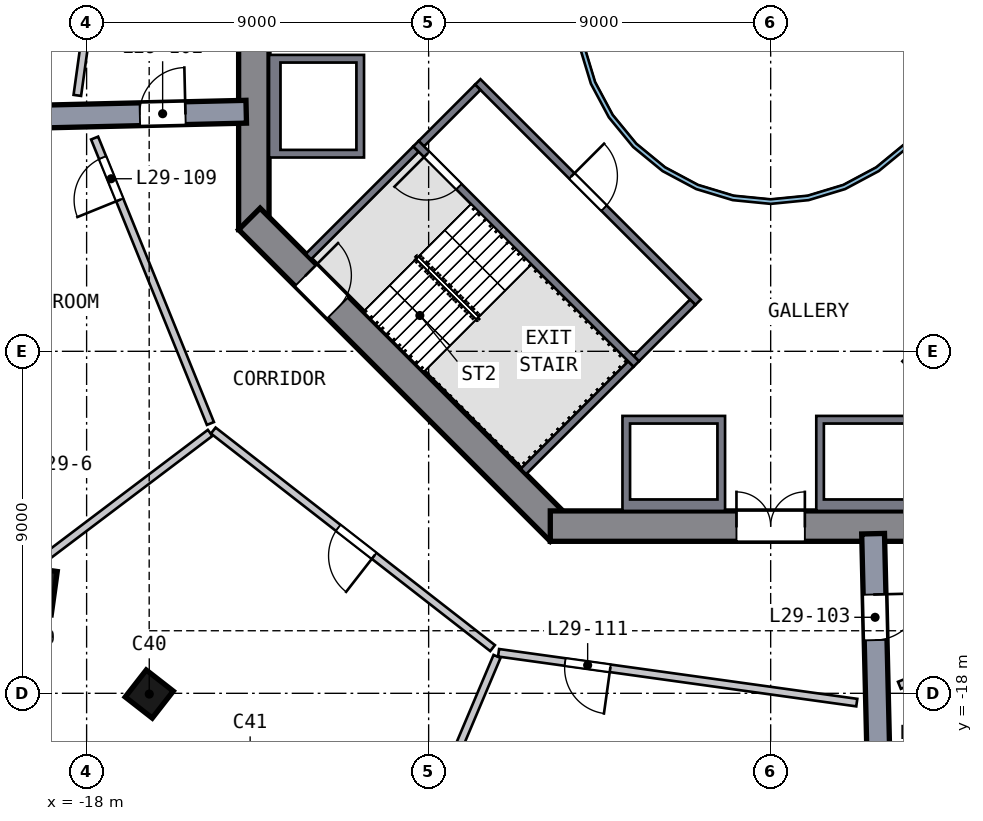
"""IFC4 building model, lengths in metres.
Left out: names, types, materials, properties, quantities, classifications, styles, units other than length and angle.
Written with IfcOpenShell. Run it as: python <this file> out.ifc"""

import sys

from ifc_helpers import new_model, si_unit, direction, frame, frame_2d, origin, origin_2d, place, context, subcontext, project, spatial, polyline, rectangle, outline, extrude, element, fill, save


model = new_model("IFC4")
c1 = context("Model", 3, precision=1e-05, world=origin(), true_north=direction((0.0, 1.0)))
c2 = subcontext(c1, "Body", "Model", "MODEL_VIEW")
j1 = project(units=[si_unit("LENGTHUNIT", "METRE"), si_unit("PLANEANGLEUNIT", "RADIAN")], contexts=[c1])
p1 = place(None, origin())
s1 = spatial("IfcSite", under=j1, at=p1, CompositionType="ELEMENT")
p2 = place(p1, origin())
s2 = spatial("IfcBuilding", under=s1, at=p2, CompositionType="ELEMENT")
p3 = place(p2, frame((0.0, 0.0, 122.0)))
s3 = spatial("IfcBuildingStorey", under=s2, at=p3, CompositionType="ELEMENT", Elevation=122.0)
p4 = place(p3, frame((-19.35, -15.238, 0.0), z_axis=(0.042921613, -0.053530234, 0.997643348), x_axis=(0.139559797, 0.989094403, 0.047067244)))
e1 = element("IfcColumn", 1, at=p4, inside=s3, PredefinedType="COLUMN", context=c2, shape_type="SweptSolid", body=[
    extrude(rectangle(XDim=1.15, YDim=0.9, at=origin_2d()), origin(), (0.0, 0.0, 1.0), 4.511),
])
p5 = place(p3, frame((-16.412, -17.965, 0.0), z_axis=(0.050393874, -0.045305771, 0.99770128), x_axis=(-0.61512318, -0.788416818, -0.00473227)))
e2 = element("IfcColumn", 2, at=p5, inside=s3, PredefinedType="COLUMN", context=c2, shape_type="SweptSolid", body=[
    extrude(rectangle(XDim=0.9, YDim=0.9, at=origin_2d()), origin(), (0.0, 0.0, 1.0), 4.51),
])
p6 = place(p3, frame((-13.6, 5.799, 0.0), z_axis=(0.0, 0.0, 1.0), x_axis=(0.0, -1.0, 0.0)))
e3 = element("IfcWall", 3, at=p6, inside=s3, PredefinedType="SHEAR", context=c2, shape_type="SweptSolid", body=[
    extrude(rectangle(XDim=11.598, YDim=0.8, at=frame_2d((5.799, 0.0))), origin(), (0.0, 0.0, 1.0), 6.0),
])
p7 = place(p6, frame((4.899, 0.0, 0.0)))
e4 = element("IfcOpeningElement", 4, at=p7, cuts=e3, PredefinedType="OPENING", context=c2, shape_type="SweptSolid", body=[
    extrude(rectangle(XDim=1.8, YDim=2.1, at=frame_2d((0.9, 1.05))), frame((0.0, 0.41, 0.0), z_axis=(0.0, -1.0, 0.0), x_axis=(1.0, 0.0, 0.0)), (0.0, 0.0, 1.0), 0.82),
])
p8 = place(p3, frame((-13.717, -5.516, 0.0), z_axis=(0.0, 0.0, 1.0), x_axis=(0.707106781, -0.707106781, 0.0)))
e5 = element("IfcWall", 5, at=p8, inside=s3, PredefinedType="SHEAR", context=c2, shape_type="SweptSolid", body=[
    extrude(rectangle(XDim=11.598, YDim=0.8, at=frame_2d((5.799, 0.0))), origin(), (0.0, 0.0, 1.0), 6.0),
])
p9 = place(p8, frame((2.099, 0.0, 0.0)))
e6 = element("IfcOpeningElement", 6, at=p9, cuts=e5, PredefinedType="OPENING", context=c2, shape_type="SweptSolid", body=[
    extrude(rectangle(XDim=1.2, YDim=2.1, at=frame_2d((0.6, 1.05))), frame((0.0, 0.41, 0.0), z_axis=(0.0, -1.0, 0.0), x_axis=(1.0, 0.0, 0.0)), (0.0, 0.0, 1.0), 0.82),
])
p10 = place(p3, frame((-5.799, -13.6, 0.0), z_axis=(0.0, 0.0, 1.0), x_axis=(1.0, 0.0, 0.0)))
e7 = element("IfcWall", 7, at=p10, inside=s3, PredefinedType="SHEAR", context=c2, shape_type="SweptSolid", body=[
    extrude(rectangle(XDim=11.598, YDim=0.8, at=frame_2d((5.799, 0.0))), origin(), (0.0, 0.0, 1.0), 6.0),
])
p11 = place(p10, frame((4.899, 0.0, 0.0)))
e8 = element("IfcOpeningElement", 8, at=p11, cuts=e7, PredefinedType="OPENING", context=c2, shape_type="SweptSolid", body=[
    extrude(rectangle(XDim=1.8, YDim=2.1, at=frame_2d((0.9, 1.05))), frame((0.0, 0.41, 0.0), z_axis=(0.0, -1.0, 0.0), x_axis=(1.0, 0.0, 0.0)), (0.0, 0.0, 1.0), 0.82),
])
p12 = place(p3, frame((-13.8, -2.695, 0.0), z_axis=(0.0, 0.0, 1.0), x_axis=(-0.999719627, -0.023678425, 0.0)))
e9 = element("IfcWall", 9, at=p12, inside=s3, PredefinedType="SHEAR", context=c2, shape_type="SweptSolid", body=[
    extrude(rectangle(XDim=9.764, YDim=0.6, at=frame_2d((4.882, 0.0))), origin(), (0.0, 0.0, 1.0), 4.5),
])
p13 = place(p12, frame((1.6, 0.0, 0.0)))
e10 = element("IfcOpeningElement", 10, at=p13, cuts=e9, PredefinedType="OPENING", context=c2, shape_type="SweptSolid", body=[
    extrude(rectangle(XDim=1.2, YDim=2.1, at=frame_2d((0.6, 1.05))), frame((0.0, 0.31, 0.0), z_axis=(0.0, -1.0, 0.0), x_axis=(1.0, 0.0, 0.0)), (0.0, 0.0, 1.0), 0.62),
])
p14 = place(p3, frame((2.695, -13.8, 0.0), z_axis=(0.0, 0.0, 1.0), x_axis=(0.023678425, -0.999719627, 0.0)))
e11 = element("IfcWall", 11, at=p14, inside=s3, PredefinedType="SHEAR", context=c2, shape_type="SweptSolid", body=[
    extrude(rectangle(XDim=9.764, YDim=0.6, at=frame_2d((4.882, 0.0))), origin(), (0.0, 0.0, 1.0), 4.5),
])
p15 = place(p14, frame((1.6, 0.0, 0.0)))
e12 = element("IfcOpeningElement", 12, at=p15, cuts=e11, PredefinedType="OPENING", context=c2, shape_type="SweptSolid", body=[
    extrude(rectangle(XDim=1.2, YDim=2.1, at=frame_2d((0.6, 1.05))), frame((0.0, 0.31, 0.0), z_axis=(0.0, -1.0, 0.0), x_axis=(1.0, 0.0, 0.0)), (0.0, 0.0, 1.0), 0.62),
])
p16 = place(p3, origin())
e13 = element("IfcWall", 13, at=p16, inside=s3, PredefinedType="SOLIDWALL", context=c2, shape_type="SweptSolid", body=[
    extrude(outline(polyline([(-10.7, -3.9), (-13.2, -3.9), (-13.2, -1.2), (-10.7, -1.2), (-10.7, -3.9)]), holes=[polyline([(-12.9, -1.4), (-12.9, -3.7), (-10.9, -3.7), (-10.9, -1.4), (-12.9, -1.4)])]), origin(), (0.0, 0.0, 1.0), 5.55),
])
p17 = place(p3, origin())
e14 = element("IfcWall", 14, at=p17, inside=s3, PredefinedType="SOLIDWALL", context=c2, shape_type="SweptSolid", body=[
    extrude(outline(polyline([(-1.2, -13.2), (-3.9, -13.2), (-3.9, -10.7), (-1.2, -10.7), (-1.2, -13.2)]), holes=[polyline([(-3.7, -10.9), (-3.7, -12.9), (-1.4, -12.9), (-1.4, -10.9), (-3.7, -10.9)])]), origin(), (0.0, 0.0, 1.0), 5.55),
])
p18 = place(p3, origin())
e15 = element("IfcWall", 15, at=p18, inside=s3, PredefinedType="SOLIDWALL", context=c2, shape_type="SweptSolid", body=[
    extrude(outline(polyline([(3.9, -10.7), (3.9, -13.2), (1.2, -13.2), (1.2, -10.7), (3.9, -10.7)]), holes=[polyline([(1.4, -12.9), (3.7, -12.9), (3.7, -10.9), (1.4, -10.9), (1.4, -12.9)])]), origin(), (0.0, 0.0, 1.0), 5.55),
])
p19 = place(p3, frame((-3.535, -9.334, 0.0), z_axis=(0.0, 0.0, 1.0), x_axis=(-0.707106781, 0.707106781, 0.0)))
e16 = element("IfcWall", 16, at=p19, inside=s3, PredefinedType="SOLIDWALL", context=c2, shape_type="SweptSolid", body=[
    extrude(rectangle(XDim=8.2, YDim=0.2, at=frame_2d((4.1, 0.0))), origin(), (0.0, 0.0, 1.0), 5.55),
])
p20 = place(p19, frame((6.6, 0.0, 0.0)))
e17 = element("IfcOpeningElement", 17, at=p20, cuts=e16, PredefinedType="OPENING", context=c2, shape_type="SweptSolid", body=[
    extrude(rectangle(XDim=1.2, YDim=2.1, at=frame_2d((0.6, 1.05))), frame((0.0, 0.11, 0.0), z_axis=(0.0, -1.0, 0.0), x_axis=(1.0, 0.0, 0.0)), (0.0, 0.0, 1.0), 0.22),
])
for number, where, z_axis, x_axis in (
    (18, (-9.334, -3.677, 0.0), (0.0, 0.0, 1.0), (-0.707, -0.707, 0.0)),
    (19, (-3.677, -9.334, 0.0), (0.0, 0.0, 1.0), (-0.707, -0.707, 0.0)),
):
    element("IfcWall", number, at=place(p3, frame(where, z_axis=z_axis, x_axis=x_axis)), inside=s3, PredefinedType="SOLIDWALL", context=c2, shape_type="SweptSolid", body=[
        extrude(rectangle(XDim=4.0, YDim=0.2, at=frame_2d((2.0, 0.0))), origin(), (0.0, 0.0, 1.0), 5.55),
    ])
p21 = place(p3, frame((9.334, -3.535, 0.0), z_axis=(0.0, 0.0, 1.0), x_axis=(-0.707106781, -0.707106781, 0.0)))
e20 = element("IfcWall", 20, at=p21, inside=s3, PredefinedType="SOLIDWALL", context=c2, shape_type="SweptSolid", body=[
    extrude(rectangle(XDim=8.2, YDim=0.2, at=frame_2d((4.1, 0.0))), origin(), (0.0, 0.0, 1.0), 5.55),
])
p22 = place(p21, frame((6.6, 0.0, 0.0)))
e21 = element("IfcOpeningElement", 21, at=p22, cuts=e20, PredefinedType="OPENING", context=c2, shape_type="SweptSolid", body=[
    extrude(rectangle(XDim=1.2, YDim=2.1, at=frame_2d((0.6, 1.05))), frame((0.0, 0.11, 0.0), z_axis=(0.0, -1.0, 0.0), x_axis=(1.0, 0.0, 0.0)), (0.0, 0.0, 1.0), 0.22),
])
p23 = place(p3, frame((-7.708, -1.909, 0.0), z_axis=(0.0, 0.0, 1.0), x_axis=(0.707106781, -0.707106781, 0.0)))
e22 = element("IfcWall", 22, at=p23, inside=s3, PredefinedType="SOLIDWALL", context=c2, shape_type="SweptSolid", body=[
    extrude(rectangle(XDim=8.2, YDim=0.2, at=frame_2d((4.1, 0.0))), origin(), (0.0, 0.0, 1.0), 5.55),
])
p24 = place(p23, frame((3.5, 0.0, 0.0)))
e23 = element("IfcOpeningElement", 23, at=p24, cuts=e22, PredefinedType="OPENING", context=c2, shape_type="SweptSolid", body=[
    extrude(rectangle(XDim=1.2, YDim=2.1, at=frame_2d((0.6, 1.05))), frame((0.0, 0.11, 0.0), z_axis=(0.0, -1.0, 0.0), x_axis=(1.0, 0.0, 0.0)), (0.0, 0.0, 1.0), 0.22),
])
for number, where, z_axis, x_axis in (
    (24, (-7.708, -2.051, 0.0), (0.0, 0.0, 1.0), (-0.707, -0.707, 0.0)),
    (25, (-2.051, -7.708, 0.0), (0.0, 0.0, 1.0), (-0.707, -0.707, 0.0)),
):
    element("IfcWall", number, at=place(p3, frame(where, z_axis=z_axis, x_axis=x_axis)), inside=s3, PredefinedType="SOLIDWALL", context=c2, shape_type="SweptSolid", body=[
        extrude(rectangle(XDim=2.1, YDim=0.2, at=frame_2d((1.05, 0.0))), origin(), (0.0, 0.0, 1.0), 5.55),
    ])
p25 = place(p3, origin())
e26 = element("IfcWall", 26, at=p25, inside=s3, PredefinedType="SOLIDWALL", context=c2, shape_type="SweptSolid", body=[
    extrude(outline(polyline([(5.021, -0.999), (4.73, -1.959), (4.257, -2.844), (3.62, -3.62), (2.844, -4.257), (1.959, -4.73), (0.999, -5.021), (0.0, -5.12), (-0.999, -5.021), (-1.959, -4.73), (-2.844, -4.257), (-3.62, -3.62), (-4.257, -2.844), (-4.73, -1.959), (-5.021, -0.999), (-5.12, 0.0), (-5.021, 0.999), (-4.73, 1.959), (-4.257, 2.844), (-3.62, 3.62), (-2.844, 4.257), (-1.959, 4.73), (-0.999, 5.021), (0.0, 5.12), (0.999, 5.021), (1.959, 4.73), (2.844, 4.257), (3.62, 3.62), (4.257, 2.844), (4.73, 1.959), (5.021, 0.999), (5.12, 0.0), (5.021, -0.999)]), holes=[polyline([(4.904, 0.976), (4.619, 1.913), (4.157, 2.778), (3.535, 3.535), (2.778, 4.157), (1.913, 4.619), (0.976, 4.904), (0.0, 5.0), (-0.976, 4.904), (-1.913, 4.619), (-2.778, 4.157), (-3.535, 3.535), (-4.157, 2.778), (-4.619, 1.913), (-4.904, 0.976), (-5.0, 0.0), (-4.904, -0.976), (-4.619, -1.913), (-4.157, -2.778), (-3.535, -3.535), (-2.778, -4.157), (-1.913, -4.619), (-0.976, -4.904), (0.0, -5.0), (0.976, -4.904), (1.913, -4.619), (2.778, -4.157), (3.535, -3.535), (4.157, -2.778), (4.619, -1.913), (4.904, -0.976), (5.0, 0.0), (4.904, 0.976)])]), origin(), (0.0, 0.0, 1.0), 5.55),
])
p26 = place(p3, frame((-17.616, 2.249, 0.0), z_axis=(0.0, 0.0, 1.0), x_axis=(-0.137775664, -0.99046346, 0.0)))
e27 = element("IfcWall", 27, at=p26, inside=s3, PredefinedType="SOLIDWALL", context=c2, shape_type="SweptSolid", body=[
    extrude(rectangle(XDim=4.558, YDim=0.2, at=frame_2d((2.279, 0.0))), origin(), (0.0, 0.0, 1.0), 4.5),
])
p27 = place(p3, frame((-14.75, -11.147, 0.0), z_axis=(0.0, 0.0, 1.0), x_axis=(-0.797800426, -0.60292162, 0.0)))
e28 = element("IfcWall", 28, at=p27, inside=s3, PredefinedType="SOLIDWALL", context=c2, shape_type="SweptSolid", body=[
    extrude(rectangle(XDim=6.476, YDim=0.2, at=frame_2d((3.238, 0.0))), origin(), (0.0, 0.0, 1.0), 4.5),
])
p28 = place(p3, frame((-14.742, -10.899, 0.0), z_axis=(0.0, 0.0, 1.0), x_axis=(-0.375883377, 0.926666977, 0.0)))
e29 = element("IfcWall", 29, at=p28, inside=s3, PredefinedType="SOLIDWALL", context=c2, shape_type="SweptSolid", body=[
    extrude(rectangle(XDim=8.106, YDim=0.2, at=frame_2d((4.053, 0.0))), origin(), (0.0, 0.0, 1.0), 4.5),
])
p29 = place(p28, frame((6.35, 0.0, 0.0)))
e30 = element("IfcOpeningElement", 30, at=p29, cuts=e29, PredefinedType="OPENING", context=c2, shape_type="SweptSolid", body=[
    extrude(rectangle(XDim=1.2, YDim=2.1, at=frame_2d((0.6, 1.05))), frame((0.0, 0.11, 0.0), z_axis=(0.0, -1.0, 0.0), x_axis=(1.0, 0.0, 0.0)), (0.0, 0.0, 1.0), 0.22),
])
p30 = place(p3, frame((-7.318, -16.81, 0.0), z_axis=(0.0, 0.0, 1.0), x_axis=(-0.788872225, 0.614557249, 0.0)))
e31 = element("IfcWall", 31, at=p30, inside=s3, PredefinedType="SOLIDWALL", context=c2, shape_type="SweptSolid", body=[
    extrude(rectangle(XDim=9.317, YDim=0.2, at=frame_2d((4.658, 0.0))), origin(), (0.0, 0.0, 1.0), 4.5),
])
p31 = place(p30, frame((3.95, 0.0, 0.0)))
e32 = element("IfcOpeningElement", 32, at=p31, cuts=e31, PredefinedType="OPENING", context=c2, shape_type="SweptSolid", body=[
    extrude(rectangle(XDim=1.2, YDim=2.1, at=frame_2d((0.6, 1.05))), frame((0.0, 0.11, 0.0), z_axis=(0.0, -1.0, 0.0), x_axis=(1.0, 0.0, 0.0)), (0.0, 0.0, 1.0), 0.22),
])
p32 = place(p3, frame((-7.2, -17.029, 0.0), z_axis=(0.0, 0.0, 1.0), x_axis=(-0.389472788, -0.921037973, 0.0)))
e33 = element("IfcWall", 33, at=p32, inside=s3, PredefinedType="SOLIDWALL", context=c2, shape_type="SweptSolid", body=[
    extrude(rectangle(XDim=5.526, YDim=0.2, at=frame_2d((2.763, 0.0))), origin(), (0.0, 0.0, 1.0), 4.5),
])
p33 = place(p3, frame((2.266, -18.245, 0.0), z_axis=(0.0, 0.0, 1.0), x_axis=(-0.990462051, 0.137785793, 0.0)))
e34 = element("IfcWall", 34, at=p33, inside=s3, PredefinedType="SOLIDWALL", context=c2, shape_type="SweptSolid", body=[
    extrude(rectangle(XDim=9.517, YDim=0.2, at=frame_2d((4.758, 0.0))), origin(), (0.0, 0.0, 1.0), 4.5),
])
p34 = place(p33, frame((6.55, 0.0, 0.0)))
e35 = element("IfcOpeningElement", 35, at=p34, cuts=e34, PredefinedType="OPENING", context=c2, shape_type="SweptSolid", body=[
    extrude(rectangle(XDim=1.2, YDim=2.1, at=frame_2d((0.6, 1.05))), frame((0.0, 0.11, 0.0), z_axis=(0.0, -1.0, 0.0), x_axis=(1.0, 0.0, 0.0)), (0.0, 0.0, 1.0), 0.22),
])
p35 = place(p3, frame((11.085, -14.667, 0.0), z_axis=(0.0, 0.0, 1.0), x_axis=(-0.926665674, -0.37588659, 0.0)))
e36 = element("IfcWall", 36, at=p35, inside=s3, PredefinedType="SOLIDWALL", context=c2, shape_type="SweptSolid", body=[
    extrude(rectangle(XDim=8.306, YDim=0.2, at=frame_2d((4.153, 0.0))), origin(), (0.0, 0.0, 1.0), 4.5),
])
p36 = place(p35, frame((6.55, 0.0, 0.0)))
e37 = element("IfcOpeningElement", 37, at=p36, cuts=e36, PredefinedType="OPENING", context=c2, shape_type="SweptSolid", body=[
    extrude(rectangle(XDim=1.2, YDim=2.1, at=frame_2d((0.6, 1.05))), frame((0.0, 0.11, 0.0), z_axis=(0.0, -1.0, 0.0), x_axis=(1.0, 0.0, 0.0)), (0.0, 0.0, 1.0), 0.22),
])
p37 = place(p20, origin())
e38 = element("IfcDoor", 38, at=p37, inside=s3, OperationType="SINGLE_SWING_RIGHT", PredefinedType="DOOR", context=c2, shape_type="SweptSolid", body=[
    extrude(rectangle(XDim=1.2, YDim=2.1, at=frame_2d((0.6, 1.05))), frame((0.0, 0.025, 0.0), z_axis=(0.0, -1.0, 0.0), x_axis=(1.0, 0.0, 0.0)), (0.0, 0.0, 1.0), 0.05),
])
fill(e17, e38)
p38 = place(p11, origin())
e39 = element("IfcDoor", 39, at=p38, inside=s3, OperationType="DOUBLE_DOOR_SINGLE_SWING", PredefinedType="DOOR", context=c2, shape_type="SweptSolid", body=[
    extrude(rectangle(XDim=1.8, YDim=2.1, at=frame_2d((0.9, 1.05))), frame((0.0, 0.025, 0.0), z_axis=(0.0, -1.0, 0.0), x_axis=(1.0, 0.0, 0.0)), (0.0, 0.0, 1.0), 0.05),
])
fill(e8, e39)
p39 = place(p9, origin())
e40 = element("IfcDoor", 40, at=p39, inside=s3, OperationType="SINGLE_SWING_LEFT", PredefinedType="DOOR", context=c2, shape_type="SweptSolid", body=[
    extrude(rectangle(XDim=1.2, YDim=2.1, at=frame_2d((0.6, 1.05))), frame((0.0, 0.025, 0.0), z_axis=(0.0, -1.0, 0.0), x_axis=(1.0, 0.0, 0.0)), (0.0, 0.0, 1.0), 0.05),
])
fill(e6, e40)
p40 = place(p24, origin())
e41 = element("IfcDoor", 41, at=p40, inside=s3, OperationType="SINGLE_SWING_LEFT", PredefinedType="DOOR", context=c2, shape_type="SweptSolid", body=[
    extrude(rectangle(XDim=1.2, YDim=2.1, at=frame_2d((0.6, 1.05))), frame((0.0, 0.025, 0.0), z_axis=(0.0, -1.0, 0.0), x_axis=(1.0, 0.0, 0.0)), (0.0, 0.0, 1.0), 0.05),
])
fill(e23, e41)
p41 = place(p13, origin())
e42 = element("IfcDoor", 42, at=p41, inside=s3, OperationType="SINGLE_SWING_LEFT", PredefinedType="DOOR", context=c2, shape_type="SweptSolid", body=[
    extrude(rectangle(XDim=1.2, YDim=2.1, at=frame_2d((0.6, 1.05))), frame((0.0, 0.025, 0.0), z_axis=(0.0, -1.0, 0.0), x_axis=(1.0, 0.0, 0.0)), (0.0, 0.0, 1.0), 0.05),
])
fill(e10, e42)
p42 = place(p15, origin())
e43 = element("IfcDoor", 43, at=p42, inside=s3, OperationType="SINGLE_SWING_LEFT", PredefinedType="DOOR", context=c2, shape_type="SweptSolid", body=[
    extrude(rectangle(XDim=1.2, YDim=2.1, at=frame_2d((0.6, 1.05))), frame((0.0, 0.025, 0.0), z_axis=(0.0, -1.0, 0.0), x_axis=(1.0, 0.0, 0.0)), (0.0, 0.0, 1.0), 0.05),
])
fill(e12, e43)
p43 = place(p29, origin())
e44 = element("IfcDoor", 44, at=p43, inside=s3, OperationType="SINGLE_SWING_LEFT", PredefinedType="DOOR", context=c2, shape_type="SweptSolid", body=[
    extrude(rectangle(XDim=1.2, YDim=2.1, at=frame_2d((0.6, 1.05))), frame((0.0, 0.025, 0.0), z_axis=(0.0, -1.0, 0.0), x_axis=(1.0, 0.0, 0.0)), (0.0, 0.0, 1.0), 0.05),
])
fill(e30, e44)
p44 = place(p31, origin())
e45 = element("IfcDoor", 45, at=p44, inside=s3, OperationType="SINGLE_SWING_LEFT", PredefinedType="DOOR", context=c2, shape_type="SweptSolid", body=[
    extrude(rectangle(XDim=1.2, YDim=2.1, at=frame_2d((0.6, 1.05))), frame((0.0, 0.025, 0.0), z_axis=(0.0, -1.0, 0.0), x_axis=(1.0, 0.0, 0.0)), (0.0, 0.0, 1.0), 0.05),
])
fill(e32, e45)
p45 = place(p34, origin())
e46 = element("IfcDoor", 46, at=p45, inside=s3, OperationType="SINGLE_SWING_LEFT", PredefinedType="DOOR", context=c2, shape_type="SweptSolid", body=[
    extrude(rectangle(XDim=1.2, YDim=2.1, at=frame_2d((0.6, 1.05))), frame((0.0, 0.025, 0.0), z_axis=(0.0, -1.0, 0.0), x_axis=(1.0, 0.0, 0.0)), (0.0, 0.0, 1.0), 0.05),
])
fill(e35, e46)
save(model, sys.argv[1])
